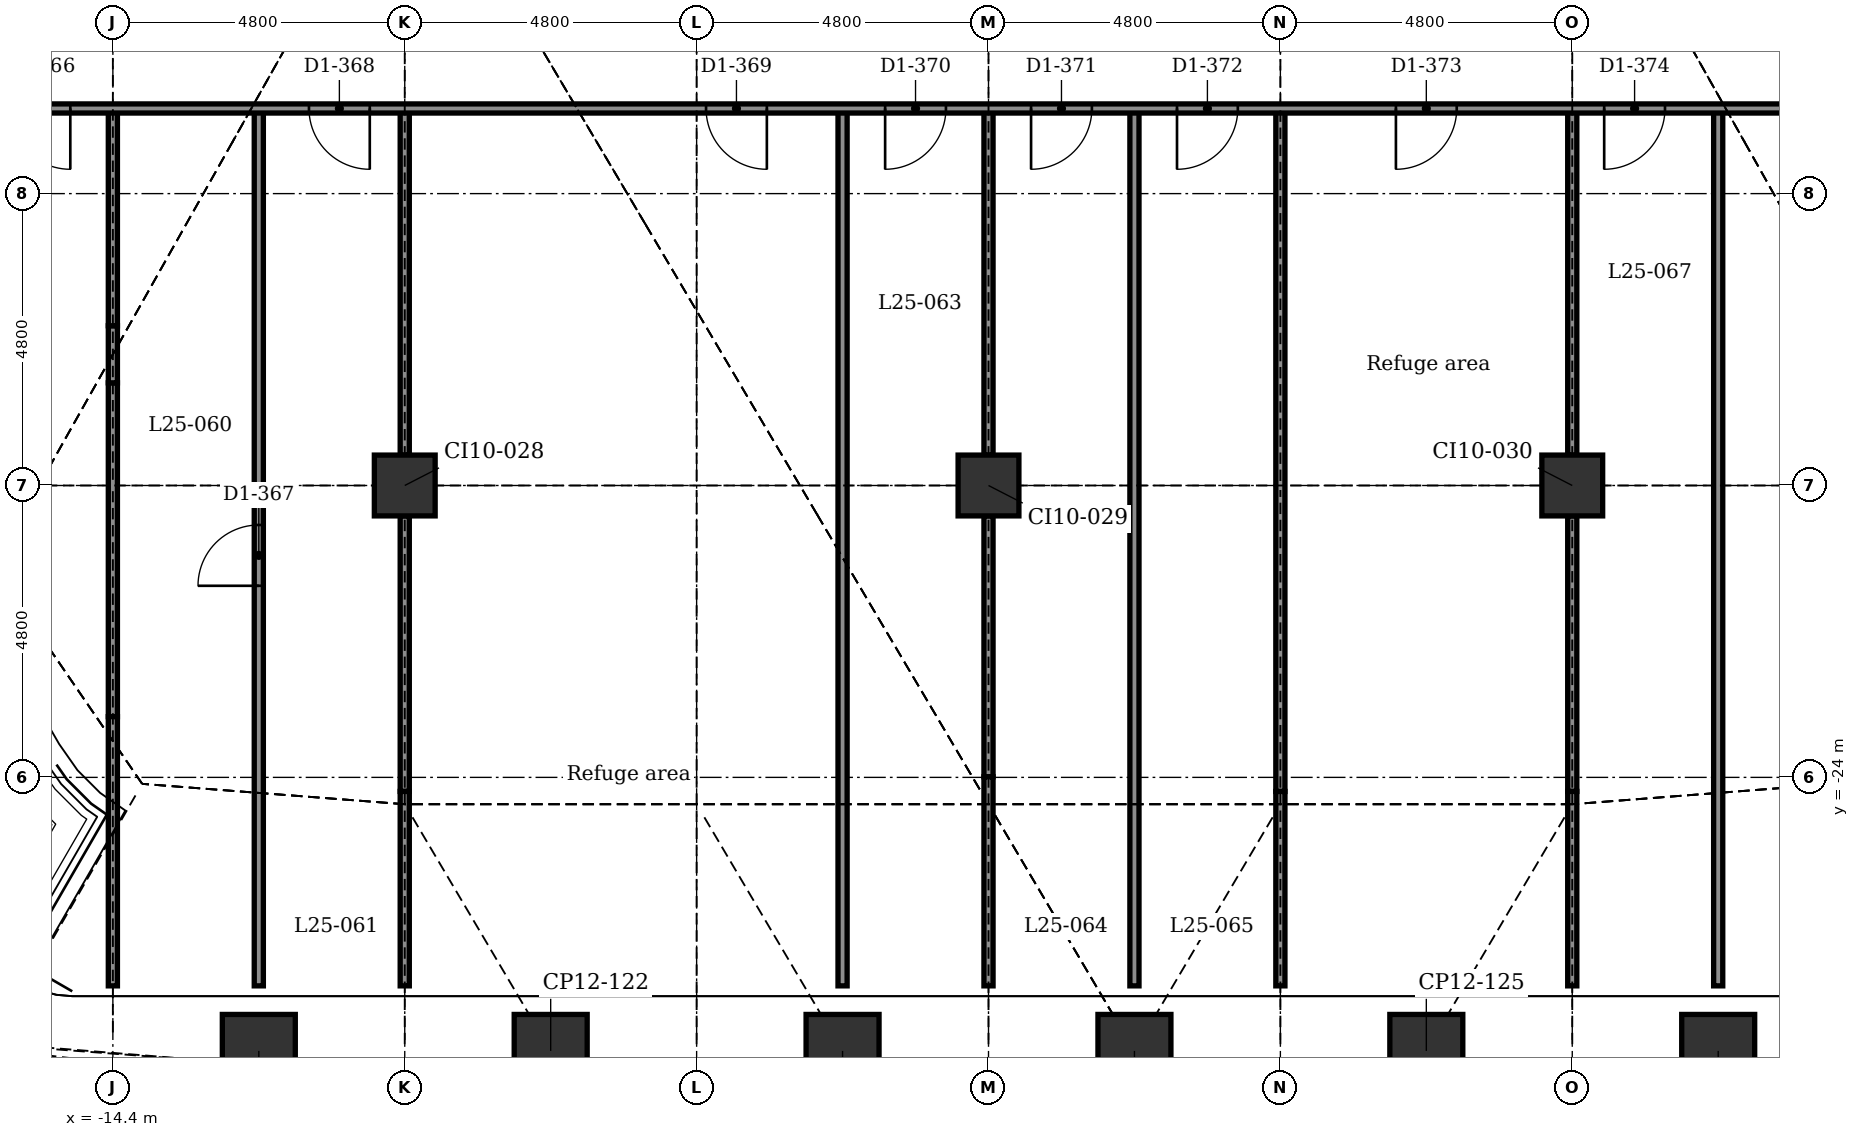
"""IFC4 building model, lengths in metres.
Left out: names, types, materials, properties, quantities, classifications, styles, units other than length and angle.
Written with IfcOpenShell. Run it as: python <this file> out.ifc"""

import sys

from ifc_helpers import new_model, si_unit, direction, frame, frame_2d, origin, origin_2d, place, context, subcontext, project, spatial, rectangle, extrude, element, fill, save


model = new_model("IFC4")
c1 = context("Model", 3, precision=1e-05, world=origin(), true_north=direction((0.0, 1.0)))
c2 = subcontext(c1, "Body", "Model", "MODEL_VIEW")
j1 = project(units=[si_unit("LENGTHUNIT", "METRE"), si_unit("PLANEANGLEUNIT", "RADIAN")], contexts=[c1])
p1 = place(None, origin())
s1 = spatial("IfcSite", under=j1, at=p1, CompositionType="ELEMENT")
p2 = place(p1, origin())
s2 = spatial("IfcBuilding", under=s1, at=p2, CompositionType="ELEMENT")
p3 = place(p2, frame((0.0, 0.0, 127.4)))
s3 = spatial("IfcBuildingStorey", under=s2, at=p3, CompositionType="ELEMENT", Elevation=127.4)
for number, where, z_axis, x_axis in (
    (1, (12.0, -28.499, -0.3), (0.0, 0.0, 1.0), (1.0, 0.0, 0.0)),
    (2, (7.2, -28.499, -0.3), (0.0, 0.0, 1.0), (1.0, 0.0, 0.0)),
    (3, (2.4, -28.499, -0.3), (0.0, 0.0, 1.0), (1.0, 0.0, 0.0)),
    (4, (-2.4, -28.499, -0.3), (0.0, 0.0, 1.0), (1.0, 0.0, 0.0)),
    (5, (-7.2, -28.499, -0.3), (0.0, 0.0, 1.0), (1.0, 0.0, 0.0)),
    (6, (-12.0, -28.499, -0.3), (0.0, 0.0, 1.0), (1.0, 0.0, 0.0)),
):
    element("IfcColumn", number, at=place(p3, frame(where, z_axis=z_axis, x_axis=x_axis)), inside=s3, PredefinedType="COLUMN", context=c2, shape_type="SweptSolid", body=[
        extrude(rectangle(XDim=1.2, YDim=1.2, at=origin_2d()), origin(), (0.0, 0.0, 1.0), 6.15),
    ])
for number, where, z_axis, x_axis in (
    (7, (-9.6, -19.2, -0.3), (0.0, 0.0, 1.0), (1.0, 0.0, 0.0)),
    (8, (0.0, -19.2, -0.3), (0.0, 0.0, 1.0), (1.0, 0.0, 0.0)),
    (9, (9.6, -19.2, -0.3), (0.0, 0.0, 1.0), (1.0, 0.0, 0.0)),
):
    element("IfcColumn", number, at=place(p3, frame(where, z_axis=z_axis, x_axis=x_axis)), inside=s3, PredefinedType="COLUMN", context=c2, shape_type="SweptSolid", body=[
        extrude(rectangle(XDim=1.0, YDim=1.0, at=origin_2d()), origin(), (0.0, 0.0, 1.0), 6.15),
    ])
p4 = place(p3, frame((12.0, -27.428, 0.0), z_axis=(0.0, 0.0, 1.0), x_axis=(0.0, 1.0, 0.0)))
e10 = element("IfcWall", 10, at=p4, inside=s3, PredefinedType="PARTITIONING", context=c2, shape_type="SweptSolid", body=[
    extrude(rectangle(XDim=14.428, YDim=0.15, at=frame_2d((7.214, 0.0))), origin(), (0.0, 0.0, 1.0), 5.85),
])
p5 = place(p3, frame((9.6, -24.231, 0.0), z_axis=(0.0, 0.0, 1.0), x_axis=(0.0, 1.0, 0.0)))
e11 = element("IfcWall", 11, at=p5, inside=s3, PredefinedType="PARTITIONING", context=c2, shape_type="SweptSolid", body=[
    extrude(rectangle(XDim=4.531, YDim=0.15, at=frame_2d((2.265, 0.0))), origin(), (0.0, 0.0, 1.0), 5.54),
])
p6 = place(p3, frame((9.6, -27.428, 0.0), z_axis=(0.0, 0.0, 1.0), x_axis=(0.0, 1.0, 0.0)))
e12 = element("IfcWall", 12, at=p6, inside=s3, PredefinedType="PARTITIONING", context=c2, shape_type="SweptSolid", body=[
    extrude(rectangle(XDim=3.198, YDim=0.15, at=frame_2d((1.599, 0.0))), origin(), (0.0, 0.0, 1.0), 5.85),
])
p7 = place(p3, frame((9.6, -18.7, 0.0), z_axis=(0.0, 0.0, 1.0), x_axis=(0.0, 1.0, 0.0)))
e13 = element("IfcWall", 13, at=p7, inside=s3, PredefinedType="PARTITIONING", context=c2, shape_type="SweptSolid", body=[
    extrude(rectangle(XDim=5.7, YDim=0.15, at=frame_2d((2.85, 0.0))), origin(), (0.0, 0.0, 1.0), 5.443),
])
p8 = place(p3, frame((4.8, -24.231, 0.0), z_axis=(0.0, 0.0, 1.0), x_axis=(0.0, 1.0, 0.0)))
e14 = element("IfcWall", 14, at=p8, inside=s3, PredefinedType="PARTITIONING", context=c2, shape_type="SweptSolid", body=[
    extrude(rectangle(XDim=11.231, YDim=0.15, at=frame_2d((5.616, 0.0))), origin(), (0.0, 0.0, 1.0), 5.166),
])
p9 = place(p3, frame((4.8, -27.428, 0.0), z_axis=(0.0, 0.0, 1.0), x_axis=(0.0, 1.0, 0.0)))
e15 = element("IfcWall", 15, at=p9, inside=s3, PredefinedType="PARTITIONING", context=c2, shape_type="SweptSolid", body=[
    extrude(rectangle(XDim=3.197, YDim=0.15, at=frame_2d((1.599, 0.0))), origin(), (0.0, 0.0, 1.0), 5.85),
])
p10 = place(p3, frame((2.4, -27.428, 0.0), z_axis=(0.0, 0.0, 1.0), x_axis=(0.0, 1.0, 0.0)))
e16 = element("IfcWall", 16, at=p10, inside=s3, PredefinedType="PARTITIONING", context=c2, shape_type="SweptSolid", body=[
    extrude(rectangle(XDim=14.428, YDim=0.15, at=frame_2d((7.214, 0.0))), origin(), (0.0, 0.0, 1.0), 5.85),
])
p11 = place(p3, frame((0.0, -23.99, 0.0), z_axis=(0.0, 0.0, 1.0), x_axis=(0.0, 1.0, 0.0)))
e17 = element("IfcWall", 17, at=p11, inside=s3, PredefinedType="PARTITIONING", context=c2, shape_type="SweptSolid", body=[
    extrude(rectangle(XDim=4.291, YDim=0.15, at=frame_2d((2.145, 0.0))), origin(), (0.0, 0.0, 1.0), 5.54),
])
p12 = place(p3, frame((0.0, -27.428, 0.0), z_axis=(0.0, 0.0, 1.0), x_axis=(0.0, 1.0, 0.0)))
e18 = element("IfcWall", 18, at=p12, inside=s3, PredefinedType="PARTITIONING", context=c2, shape_type="SweptSolid", body=[
    extrude(rectangle(XDim=3.438, YDim=0.15, at=frame_2d((1.719, 0.0))), origin(), (0.0, 0.0, 1.0), 5.85),
])
p13 = place(p3, frame((0.0, -18.7, 0.0), z_axis=(0.0, 0.0, 1.0), x_axis=(0.0, 1.0, 0.0)))
e19 = element("IfcWall", 19, at=p13, inside=s3, PredefinedType="PARTITIONING", context=c2, shape_type="SweptSolid", body=[
    extrude(rectangle(XDim=5.7, YDim=0.15, at=frame_2d((2.85, 0.0))), origin(), (0.0, 0.0, 1.0), 5.443),
])
p14 = place(p3, frame((-2.4, -27.428, 0.0), z_axis=(0.0, 0.0, 1.0), x_axis=(0.0, 1.0, 0.0)))
e20 = element("IfcWall", 20, at=p14, inside=s3, PredefinedType="PARTITIONING", context=c2, shape_type="SweptSolid", body=[
    extrude(rectangle(XDim=14.428, YDim=0.15, at=frame_2d((7.214, 0.0))), origin(), (0.0, 0.0, 1.0), 5.85),
])
p15 = place(p3, frame((-9.6, -24.231, 0.0), z_axis=(0.0, 0.0, 1.0), x_axis=(0.0, 1.0, 0.0)))
e21 = element("IfcWall", 21, at=p15, inside=s3, PredefinedType="PARTITIONING", context=c2, shape_type="SweptSolid", body=[
    extrude(rectangle(XDim=4.531, YDim=0.15, at=frame_2d((2.265, 0.0))), origin(), (0.0, 0.0, 1.0), 5.54),
])
p16 = place(p3, frame((-9.6, -27.428, 0.0), z_axis=(0.0, 0.0, 1.0), x_axis=(0.0, 1.0, 0.0)))
e22 = element("IfcWall", 22, at=p16, inside=s3, PredefinedType="PARTITIONING", context=c2, shape_type="SweptSolid", body=[
    extrude(rectangle(XDim=3.198, YDim=0.15, at=frame_2d((1.599, 0.0))), origin(), (0.0, 0.0, 1.0), 5.85),
])
p17 = place(p3, frame((-9.6, -18.7, 0.0), z_axis=(0.0, 0.0, 1.0), x_axis=(0.0, 1.0, 0.0)))
e23 = element("IfcWall", 23, at=p17, inside=s3, PredefinedType="PARTITIONING", context=c2, shape_type="SweptSolid", body=[
    extrude(rectangle(XDim=5.7, YDim=0.15, at=frame_2d((2.85, 0.0))), origin(), (0.0, 0.0, 1.0), 5.443),
])
p18 = place(p3, frame((-12.0, -27.428, 0.0), z_axis=(0.0, 0.0, 1.0), x_axis=(0.0, 1.0, 0.0)))
e24 = element("IfcWall", 24, at=p18, inside=s3, PredefinedType="PARTITIONING", context=c2, shape_type="SweptSolid", body=[
    extrude(rectangle(XDim=14.428, YDim=0.15, at=frame_2d((7.214, 0.0))), origin(), (0.0, 0.0, 1.0), 5.85),
])
p19 = place(p18, frame((6.579, 0.0, 0.0)))
e25 = element("IfcOpeningElement", 25, at=p19, cuts=e24, PredefinedType="OPENING", context=c2, shape_type="SweptSolid", body=[
    extrude(rectangle(XDim=1.0, YDim=2.1, at=frame_2d((0.5, 1.05))), frame((0.0, 0.085, 0.0), z_axis=(0.0, -1.0, 0.0), x_axis=(1.0, 0.0, 0.0)), (0.0, 0.0, 1.0), 0.17),
])
p20 = place(p3, frame((-14.4, -23.001, 0.0), z_axis=(0.0, 0.0, 1.0), x_axis=(0.0, 1.0, 0.0)))
e26 = element("IfcWall", 26, at=p20, inside=s3, PredefinedType="PARTITIONING", context=c2, shape_type="SweptSolid", body=[
    extrude(rectangle(XDim=5.489, YDim=0.15, at=frame_2d((2.745, 0.0))), origin(), (0.0, 0.0, 1.0), 5.54),
])
p21 = place(p3, frame((-14.4, -27.428, 0.0), z_axis=(0.0, 0.0, 1.0), x_axis=(0.0, 1.0, 0.0)))
e27 = element("IfcWall", 27, at=p21, inside=s3, PredefinedType="PARTITIONING", context=c2, shape_type="SweptSolid", body=[
    extrude(rectangle(XDim=4.427, YDim=0.15, at=frame_2d((2.213, 0.0))), origin(), (0.0, 0.0, 1.0), 5.7),
])
p22 = place(p3, frame((-14.4, -17.512, 0.0), z_axis=(0.0, 0.0, 1.0), x_axis=(0.0, 1.0, 0.0)))
e28 = element("IfcWall", 28, at=p22, inside=s3, PredefinedType="PARTITIONING", context=c2, shape_type="SweptSolid", body=[
    extrude(rectangle(XDim=0.939, YDim=0.15, at=frame_2d((0.469, 0.0))), origin(), (0.0, 0.0, 1.0), 5.7),
])
p23 = place(p3, frame((-14.4, -16.573, 0.0), z_axis=(0.0, 0.0, 1.0), x_axis=(0.0, 1.0, 0.0)))
e29 = element("IfcWall", 29, at=p23, inside=s3, PredefinedType="PARTITIONING", context=c2, shape_type="SweptSolid", body=[
    extrude(rectangle(XDim=3.573, YDim=0.15, at=frame_2d((1.787, 0.0))), origin(), (0.0, 0.0, 1.0), 5.54),
])
p24 = place(p3, frame((-21.6, -13.0, 0.0), z_axis=(0.0, 0.0, 1.0), x_axis=(1.0, 0.0, 0.0)))
e30 = element("IfcWall", 30, at=p24, inside=s3, PredefinedType="PARTITIONING", context=c2, shape_type="SweptSolid", body=[
    extrude(rectangle(XDim=43.2, YDim=0.15, at=frame_2d((21.6, 0.0))), origin(), (0.0, 0.0, 1.0), 5.7),
])
p25 = place(p24, frame((5.5, 0.0, 0.0)))
e31 = element("IfcOpeningElement", 31, at=p25, cuts=e30, PredefinedType="OPENING", context=c2, shape_type="SweptSolid", body=[
    extrude(rectangle(XDim=1.0, YDim=2.1, at=frame_2d((0.5, 1.05))), frame((0.0, 0.085, 0.0), z_axis=(0.0, -1.0, 0.0), x_axis=(1.0, 0.0, 0.0)), (0.0, 0.0, 1.0), 0.17),
])
p26 = place(p24, frame((10.425, 0.0, 0.0)))
e32 = element("IfcOpeningElement", 32, at=p26, cuts=e30, PredefinedType="OPENING", context=c2, shape_type="SweptSolid", body=[
    extrude(rectangle(XDim=1.0, YDim=2.1, at=frame_2d((0.5, 1.05))), frame((0.0, 0.085, 0.0), z_axis=(0.0, -1.0, 0.0), x_axis=(1.0, 0.0, 0.0)), (0.0, 0.0, 1.0), 0.17),
])
p27 = place(p24, frame((16.955, 0.0, 0.0)))
e33 = element("IfcOpeningElement", 33, at=p27, cuts=e30, PredefinedType="OPENING", context=c2, shape_type="SweptSolid", body=[
    extrude(rectangle(XDim=1.0, YDim=2.1, at=frame_2d((0.5, 1.05))), frame((0.0, 0.085, 0.0), z_axis=(0.0, -1.0, 0.0), x_axis=(1.0, 0.0, 0.0)), (0.0, 0.0, 1.0), 0.17),
])
p28 = place(p24, frame((19.9, 0.0, 0.0)))
e34 = element("IfcOpeningElement", 34, at=p28, cuts=e30, PredefinedType="OPENING", context=c2, shape_type="SweptSolid", body=[
    extrude(rectangle(XDim=1.0, YDim=2.1, at=frame_2d((0.5, 1.05))), frame((0.0, 0.085, 0.0), z_axis=(0.0, -1.0, 0.0), x_axis=(1.0, 0.0, 0.0)), (0.0, 0.0, 1.0), 0.17),
])
p29 = place(p24, frame((22.3, 0.0, 0.0)))
e35 = element("IfcOpeningElement", 35, at=p29, cuts=e30, PredefinedType="OPENING", context=c2, shape_type="SweptSolid", body=[
    extrude(rectangle(XDim=1.0, YDim=2.1, at=frame_2d((0.5, 1.05))), frame((0.0, 0.085, 0.0), z_axis=(0.0, -1.0, 0.0), x_axis=(1.0, 0.0, 0.0)), (0.0, 0.0, 1.0), 0.17),
])
p30 = place(p24, frame((24.7, 0.0, 0.0)))
e36 = element("IfcOpeningElement", 36, at=p30, cuts=e30, PredefinedType="OPENING", context=c2, shape_type="SweptSolid", body=[
    extrude(rectangle(XDim=1.0, YDim=2.1, at=frame_2d((0.5, 1.05))), frame((0.0, 0.085, 0.0), z_axis=(0.0, -1.0, 0.0), x_axis=(1.0, 0.0, 0.0)), (0.0, 0.0, 1.0), 0.17),
])
p31 = place(p24, frame((28.3, 0.0, 0.0)))
e37 = element("IfcOpeningElement", 37, at=p31, cuts=e30, PredefinedType="OPENING", context=c2, shape_type="SweptSolid", body=[
    extrude(rectangle(XDim=1.0, YDim=2.1, at=frame_2d((0.5, 1.05))), frame((0.0, 0.085, 0.0), z_axis=(0.0, -1.0, 0.0), x_axis=(1.0, 0.0, 0.0)), (0.0, 0.0, 1.0), 0.17),
])
p32 = place(p24, frame((31.725, 0.0, 0.0)))
e38 = element("IfcOpeningElement", 38, at=p32, cuts=e30, PredefinedType="OPENING", context=c2, shape_type="SweptSolid", body=[
    extrude(rectangle(XDim=1.0, YDim=2.1, at=frame_2d((0.5, 1.05))), frame((0.0, 0.085, 0.0), z_axis=(0.0, -1.0, 0.0), x_axis=(1.0, 0.0, 0.0)), (0.0, 0.0, 1.0), 0.17),
])
p33 = place(p24, frame((35.5, 0.0, 0.0)))
e39 = element("IfcOpeningElement", 39, at=p33, cuts=e30, PredefinedType="OPENING", context=c2, shape_type="SweptSolid", body=[
    extrude(rectangle(XDim=1.0, YDim=2.1, at=frame_2d((0.5, 1.05))), frame((0.0, 0.085, 0.0), z_axis=(0.0, -1.0, 0.0), x_axis=(1.0, 0.0, 0.0)), (0.0, 0.0, 1.0), 0.17),
])
p34 = place(p25, frame((1.0, 0.0, 0.0), z_axis=(0.0, 0.0, 1.0), x_axis=(-1.0, 0.0, 0.0)))
e40 = element("IfcDoor", 40, at=p34, inside=s3, OperationType="SINGLE_SWING_RIGHT", PredefinedType="DOOR", context=c2, shape_type="SweptSolid", body=[
    extrude(rectangle(XDim=1.0, YDim=2.1, at=frame_2d((0.5, 1.05))), frame((0.0, 0.025, 0.0), z_axis=(0.0, -1.0, 0.0), x_axis=(1.0, 0.0, 0.0)), (0.0, 0.0, 1.0), 0.05),
])
fill(e31, e40)
p35 = place(p19, origin())
e41 = element("IfcDoor", 41, at=p35, inside=s3, OperationType="SINGLE_SWING_LEFT", PredefinedType="DOOR", context=c2, shape_type="SweptSolid", body=[
    extrude(rectangle(XDim=1.0, YDim=2.1, at=frame_2d((0.5, 1.05))), frame((0.0, 0.025, 0.0), z_axis=(0.0, -1.0, 0.0), x_axis=(1.0, 0.0, 0.0)), (0.0, 0.0, 1.0), 0.05),
])
fill(e25, e41)
p36 = place(p26, frame((1.0, 0.0, 0.0), z_axis=(0.0, 0.0, 1.0), x_axis=(-1.0, 0.0, 0.0)))
e42 = element("IfcDoor", 42, at=p36, inside=s3, OperationType="SINGLE_SWING_RIGHT", PredefinedType="DOOR", context=c2, shape_type="SweptSolid", body=[
    extrude(rectangle(XDim=1.0, YDim=2.1, at=frame_2d((0.5, 1.05))), frame((0.0, 0.025, 0.0), z_axis=(0.0, -1.0, 0.0), x_axis=(1.0, 0.0, 0.0)), (0.0, 0.0, 1.0), 0.05),
])
fill(e32, e42)
p37 = place(p27, frame((1.0, 0.0, 0.0), z_axis=(0.0, 0.0, 1.0), x_axis=(-1.0, 0.0, 0.0)))
e43 = element("IfcDoor", 43, at=p37, inside=s3, OperationType="SINGLE_SWING_RIGHT", PredefinedType="DOOR", context=c2, shape_type="SweptSolid", body=[
    extrude(rectangle(XDim=1.0, YDim=2.1, at=frame_2d((0.5, 1.05))), frame((0.0, 0.025, 0.0), z_axis=(0.0, -1.0, 0.0), x_axis=(1.0, 0.0, 0.0)), (0.0, 0.0, 1.0), 0.05),
])
fill(e33, e43)
p38 = place(p28, frame((1.0, 0.0, 0.0), z_axis=(0.0, 0.0, 1.0), x_axis=(-1.0, 0.0, 0.0)))
e44 = element("IfcDoor", 44, at=p38, inside=s3, OperationType="SINGLE_SWING_LEFT", PredefinedType="DOOR", context=c2, shape_type="SweptSolid", body=[
    extrude(rectangle(XDim=1.0, YDim=2.1, at=frame_2d((0.5, 1.05))), frame((0.0, 0.025, 0.0), z_axis=(0.0, -1.0, 0.0), x_axis=(1.0, 0.0, 0.0)), (0.0, 0.0, 1.0), 0.05),
])
fill(e34, e44)
p39 = place(p29, frame((1.0, 0.0, 0.0), z_axis=(0.0, 0.0, 1.0), x_axis=(-1.0, 0.0, 0.0)))
e45 = element("IfcDoor", 45, at=p39, inside=s3, OperationType="SINGLE_SWING_LEFT", PredefinedType="DOOR", context=c2, shape_type="SweptSolid", body=[
    extrude(rectangle(XDim=1.0, YDim=2.1, at=frame_2d((0.5, 1.05))), frame((0.0, 0.025, 0.0), z_axis=(0.0, -1.0, 0.0), x_axis=(1.0, 0.0, 0.0)), (0.0, 0.0, 1.0), 0.05),
])
fill(e35, e45)
p40 = place(p30, frame((1.0, 0.0, 0.0), z_axis=(0.0, 0.0, 1.0), x_axis=(-1.0, 0.0, 0.0)))
e46 = element("IfcDoor", 46, at=p40, inside=s3, OperationType="SINGLE_SWING_LEFT", PredefinedType="DOOR", context=c2, shape_type="SweptSolid", body=[
    extrude(rectangle(XDim=1.0, YDim=2.1, at=frame_2d((0.5, 1.05))), frame((0.0, 0.025, 0.0), z_axis=(0.0, -1.0, 0.0), x_axis=(1.0, 0.0, 0.0)), (0.0, 0.0, 1.0), 0.05),
])
fill(e36, e46)
p41 = place(p31, frame((1.0, 0.0, 0.0), z_axis=(0.0, 0.0, 1.0), x_axis=(-1.0, 0.0, 0.0)))
e47 = element("IfcDoor", 47, at=p41, inside=s3, OperationType="SINGLE_SWING_LEFT", PredefinedType="DOOR", context=c2, shape_type="SweptSolid", body=[
    extrude(rectangle(XDim=1.0, YDim=2.1, at=frame_2d((0.5, 1.05))), frame((0.0, 0.025, 0.0), z_axis=(0.0, -1.0, 0.0), x_axis=(1.0, 0.0, 0.0)), (0.0, 0.0, 1.0), 0.05),
])
fill(e37, e47)
p42 = place(p32, frame((1.0, 0.0, 0.0), z_axis=(0.0, 0.0, 1.0), x_axis=(-1.0, 0.0, 0.0)))
e48 = element("IfcDoor", 48, at=p42, inside=s3, OperationType="SINGLE_SWING_LEFT", PredefinedType="DOOR", context=c2, shape_type="SweptSolid", body=[
    extrude(rectangle(XDim=1.0, YDim=2.1, at=frame_2d((0.5, 1.05))), frame((0.0, 0.025, 0.0), z_axis=(0.0, -1.0, 0.0), x_axis=(1.0, 0.0, 0.0)), (0.0, 0.0, 1.0), 0.05),
])
fill(e38, e48)
save(model, sys.argv[1])
